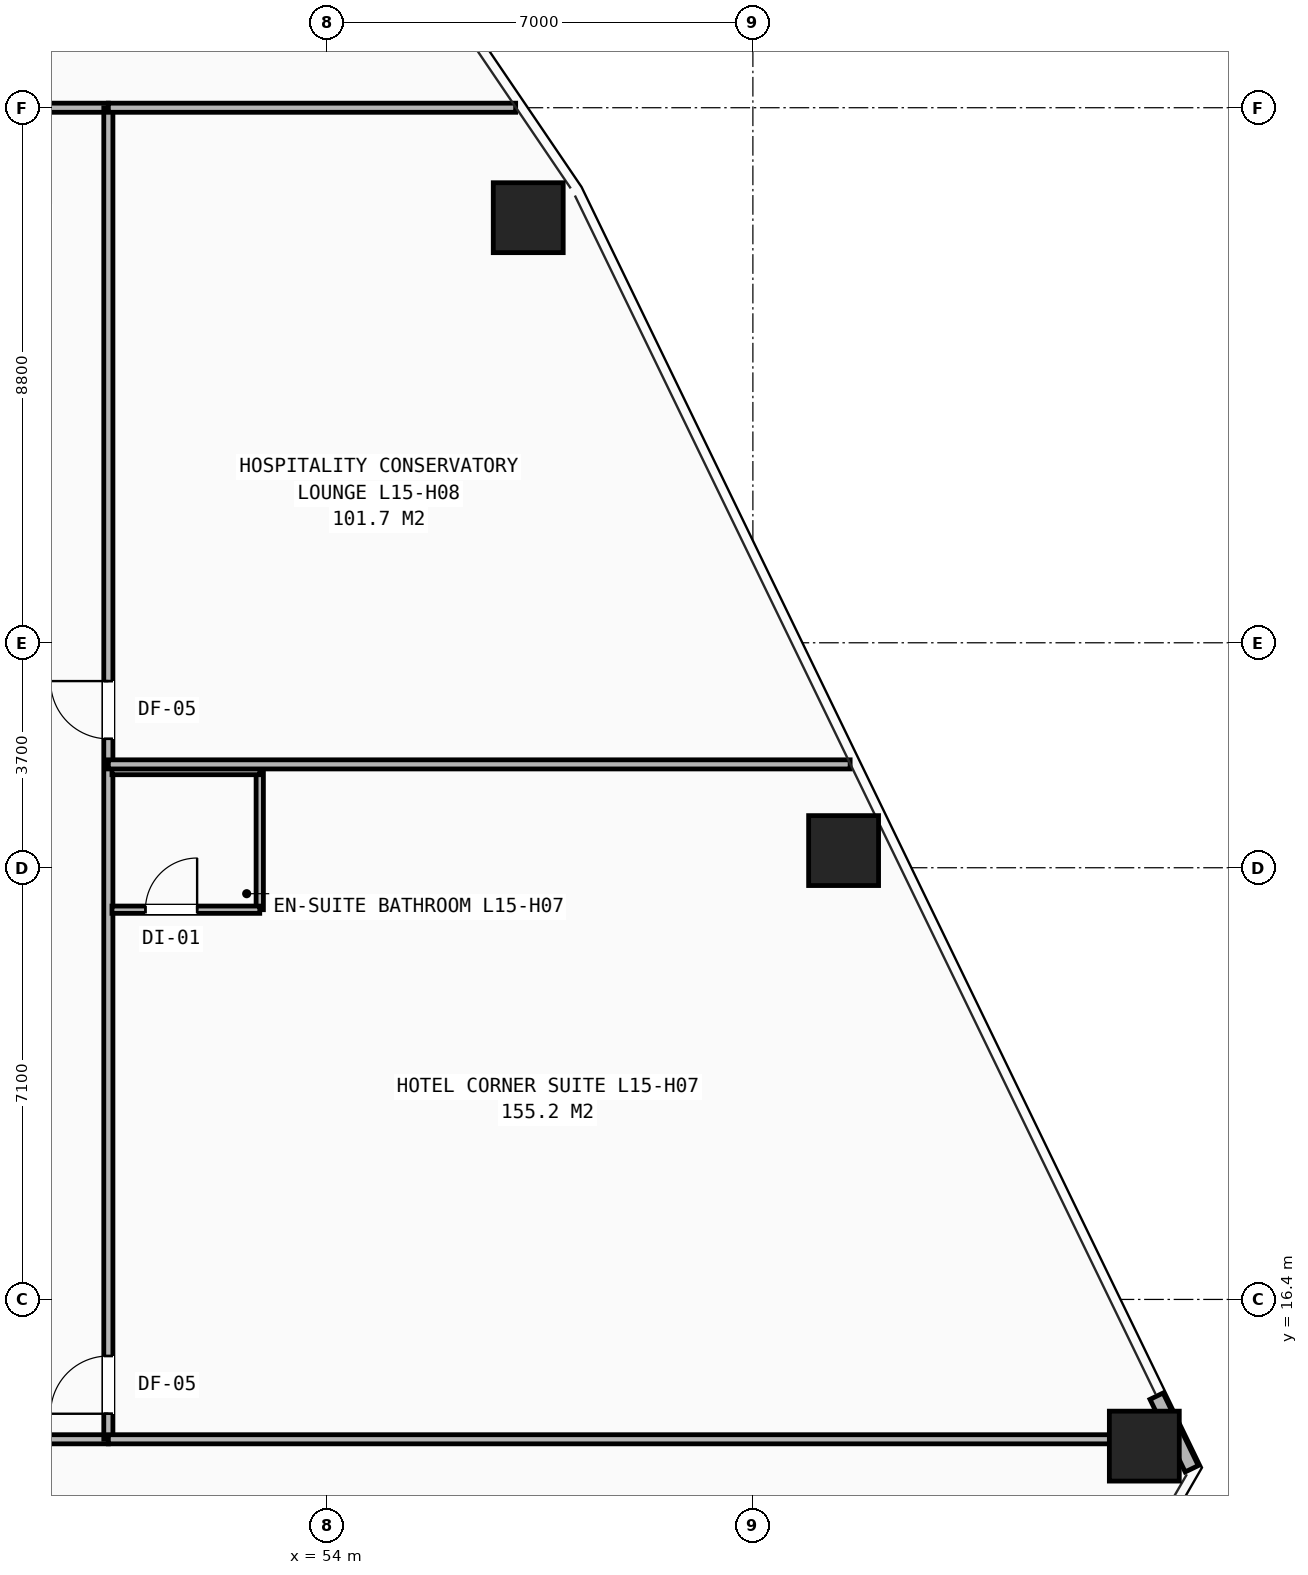
"""IFC4 building model, lengths in metres.
Left out: names, types, materials, properties, quantities, classifications, styles, units other than length and angle.
Written with IfcOpenShell. Run it as: python <this file> out.ifc"""

import sys

from ifc_helpers import new_model, si_unit, direction, frame, frame_2d, origin, origin_2d, place, context, subcontext, project, spatial, rectangle, hollow_rectangle, extrude, element, fill, save


model = new_model("IFC4")
c1 = context("Model", 3, precision=1e-05, world=origin(), true_north=direction((0.0, 1.0)))
c2 = subcontext(c1, "Body", "Model", "MODEL_VIEW")
j1 = project(units=[si_unit("LENGTHUNIT", "METRE"), si_unit("PLANEANGLEUNIT", "RADIAN")], contexts=[c1])
p1 = place(None, origin())
s1 = spatial("IfcSite", under=j1, at=p1, CompositionType="ELEMENT")
p2 = place(p1, origin())
s2 = spatial("IfcBuilding", under=s1, at=p2, CompositionType="ELEMENT")
p3 = place(p2, frame((0.0, 0.0, 56.0)))
s3 = spatial("IfcBuildingStorey", under=s2, at=p3, CompositionType="ELEMENT", Elevation=56.0)
for number, where, z_axis, x_axis in (
    (1, (67.437, 13.988, 0.0), (0.0, 0.0, 1.0), (1.0, 0.0, 0.0)),
    (2, (62.492, 23.782, 0.0), (0.0, 0.0, 1.0), (1.0, 0.0, 0.0)),
    (3, (57.305, 34.191, 0.0), (0.0, 0.0, 1.0), (1.0, 0.0, 0.0)),
):
    element("IfcColumn", number, at=place(p3, frame(where, z_axis=z_axis, x_axis=x_axis)), inside=s3, PredefinedType="COLUMN", context=c2, shape_type="SweptSolid", body=[
        extrude(hollow_rectangle(XDim=1.15, YDim=1.15, WallThickness=0.075, at=origin_2d()), origin(), (0.0, 0.0, 1.0), 3.2),
    ])
p4 = place(p3, frame((68.217, 13.615, 0.0), z_axis=(0.0, 0.0, 1.0), x_axis=(-0.435989010646, 0.89995198905, 0.0)))
e4 = element("IfcWall", 4, at=p4, inside=s3, PredefinedType="SHEAR", context=c2, shape_type="SweptSolid", body=[
    extrude(rectangle(XDim=1.327, YDim=0.24, at=frame_2d((0.663, 0.0))), origin(), (0.0, 0.0, 1.0), 2.263),
])
p5 = place(p3, frame((29.6, 14.1, 0.0), z_axis=(0.0, 0.0, 1.0), x_axis=(1.0, 0.0, 0.0)))
e5 = element("IfcWall", 5, at=p5, inside=s3, PredefinedType="PARTITIONING", context=c2, shape_type="SweptSolid", body=[
    extrude(rectangle(XDim=20.8, YDim=0.15, at=frame_2d((10.4, 0.0))), origin(), (0.0, 0.0, 1.0), 2.431),
])
p6 = place(p5, frame((0.57, 0.0, 0.0)))
e6 = element("IfcOpeningElement", 6, at=p6, cuts=e5, PredefinedType="OPENING", context=c2, shape_type="SweptSolid", body=[
    extrude(rectangle(XDim=0.95, YDim=2.1, at=frame_2d((0.475, 1.05))), frame((0.0, 0.085, 0.0), z_axis=(0.0, -1.0, 0.0), x_axis=(1.0, 0.0, 0.0)), (0.0, 0.0, 1.0), 0.17),
])
p7 = place(p5, frame((4.82, 0.0, 0.0)))
e7 = element("IfcOpeningElement", 7, at=p7, cuts=e5, PredefinedType="OPENING", context=c2, shape_type="SweptSolid", body=[
    extrude(rectangle(XDim=0.95, YDim=2.1, at=frame_2d((0.475, 1.05))), frame((0.0, 0.085, 0.0), z_axis=(0.0, -1.0, 0.0), x_axis=(1.0, 0.0, 0.0)), (0.0, 0.0, 1.0), 0.17),
])
p8 = place(p5, frame((10.82, 0.0, 0.0)))
e8 = element("IfcOpeningElement", 8, at=p8, cuts=e5, PredefinedType="OPENING", context=c2, shape_type="SweptSolid", body=[
    extrude(rectangle(XDim=0.95, YDim=2.1, at=frame_2d((0.475, 1.05))), frame((0.0, 0.085, 0.0), z_axis=(0.0, -1.0, 0.0), x_axis=(1.0, 0.0, 0.0)), (0.0, 0.0, 1.0), 0.17),
])
p9 = place(p5, frame((16.82, 0.0, 0.0)))
e9 = element("IfcOpeningElement", 9, at=p9, cuts=e5, PredefinedType="OPENING", context=c2, shape_type="SweptSolid", body=[
    extrude(rectangle(XDim=0.95, YDim=2.1, at=frame_2d((0.475, 1.05))), frame((0.0, 0.085, 0.0), z_axis=(0.0, -1.0, 0.0), x_axis=(1.0, 0.0, 0.0)), (0.0, 0.0, 1.0), 0.17),
])
p10 = place(p3, frame((40.75, 36.0, 0.0), z_axis=(0.0, 0.0, 1.0), x_axis=(1.0, 0.0, 0.0)))
e10 = element("IfcWall", 10, at=p10, inside=s3, PredefinedType="PARTITIONING", context=c2, shape_type="SweptSolid", body=[
    extrude(rectangle(XDim=9.65, YDim=0.15, at=frame_2d((4.825, 0.0))), origin(), (0.0, 0.0, 1.0), 2.513),
])
p11 = place(p3, frame((50.4, 14.1, 0.0), z_axis=(0.0, 0.0, 1.0), x_axis=(0.0, 1.0, 0.0)))
e11 = element("IfcWall", 11, at=p11, inside=s3, PredefinedType="PARTITIONING", context=c2, shape_type="SweptSolid", body=[
    extrude(rectangle(XDim=21.9, YDim=0.15, at=frame_2d((10.95, 0.0))), origin(), (0.0, 0.0, 1.0), 2.431),
])
p12 = place(p11, frame((0.42, 0.0, 0.0)))
e12 = element("IfcOpeningElement", 12, at=p12, cuts=e11, PredefinedType="OPENING", context=c2, shape_type="SweptSolid", body=[
    extrude(rectangle(XDim=0.95, YDim=2.1, at=frame_2d((0.475, 1.05))), frame((0.0, 0.085, 0.0), z_axis=(0.0, -1.0, 0.0), x_axis=(1.0, 0.0, 0.0)), (0.0, 0.0, 1.0), 0.17),
])
p13 = place(p11, frame((11.52, 0.0, 0.0)))
e13 = element("IfcOpeningElement", 13, at=p13, cuts=e11, PredefinedType="OPENING", context=c2, shape_type="SweptSolid", body=[
    extrude(rectangle(XDim=0.95, YDim=2.1, at=frame_2d((0.475, 1.05))), frame((0.0, 0.085, 0.0), z_axis=(0.0, -1.0, 0.0), x_axis=(1.0, 0.0, 0.0)), (0.0, 0.0, 1.0), 0.17),
])
p14 = place(p3, frame((50.4, 14.1, 0.0), z_axis=(0.0, 0.0, 1.0), x_axis=(1.0, 0.0, 0.0)))
e14 = element("IfcWall", 14, at=p14, inside=s3, PredefinedType="PARTITIONING", context=c2, shape_type="SweptSolid", body=[
    extrude(rectangle(XDim=17.577, YDim=0.15, at=frame_2d((8.789, 0.0))), origin(), (0.0, 0.0, 1.0), 2.268),
])
p15 = place(p3, frame((50.4, 36.0, 0.0), z_axis=(0.0, 0.0, 1.0), x_axis=(1.0, 0.0, 0.0)))
e15 = element("IfcWall", 15, at=p15, inside=s3, PredefinedType="PARTITIONING", context=c2, shape_type="SweptSolid", body=[
    extrude(rectangle(XDim=6.699, YDim=0.15, at=frame_2d((3.349, 0.0))), origin(), (0.0, 0.0, 1.0), 2.268),
])
p16 = place(p3, frame((52.89, 22.81, 0.0), z_axis=(0.0, 0.0, 1.0), x_axis=(0.0, 1.0, 0.0)))
e16 = element("IfcWall", 16, at=p16, inside=s3, PredefinedType="PARTITIONING", context=c2, shape_type="SweptSolid", body=[
    extrude(rectangle(XDim=2.28, YDim=0.12, at=frame_2d((1.14, 0.0))), origin(), (0.0, 0.0, 1.0), 2.98),
])
p17 = place(p3, frame((50.46, 22.81, 0.0), z_axis=(0.0, 0.0, 1.0), x_axis=(1.0, 0.0, 0.0)))
e17 = element("IfcWall", 17, at=p17, inside=s3, PredefinedType="PARTITIONING", context=c2, shape_type="SweptSolid", body=[
    extrude(rectangle(XDim=2.43, YDim=0.12, at=frame_2d((1.215, 0.0))), origin(), (0.0, 0.0, 1.0), 2.98),
])
p18 = place(p17, frame((0.55, 0.0, 0.0)))
e18 = element("IfcOpeningElement", 18, at=p18, cuts=e17, PredefinedType="OPENING", context=c2, shape_type="SweptSolid", body=[
    extrude(rectangle(XDim=0.85, YDim=2.05, at=frame_2d((0.425, 1.025))), frame((0.0, 0.07, 0.0), z_axis=(0.0, -1.0, 0.0), x_axis=(1.0, 0.0, 0.0)), (0.0, 0.0, 1.0), 0.14),
])
p19 = place(p3, frame((50.46, 25.09, 0.0), z_axis=(0.0, 0.0, 1.0), x_axis=(1.0, 0.0, 0.0)))
e19 = element("IfcWall", 19, at=p19, inside=s3, PredefinedType="PARTITIONING", context=c2, shape_type="SweptSolid", body=[
    extrude(rectangle(XDim=2.43, YDim=0.12, at=frame_2d((1.215, 0.0))), origin(), (0.0, 0.0, 1.0), 2.98),
])
p20 = place(p3, frame((50.4, 25.2, 0.0), z_axis=(0.0, 0.0, 1.0), x_axis=(1.0, 0.0, 0.0)))
e20 = element("IfcWall", 20, at=p20, inside=s3, PredefinedType="PARTITIONING", context=c2, shape_type="SweptSolid", body=[
    extrude(rectangle(XDim=12.199, YDim=0.15, at=frame_2d((6.1, 0.0))), origin(), (0.0, 0.0, 1.0), 2.268),
])
p21 = place(p12, origin())
e21 = element("IfcDoor", 21, at=p21, inside=s3, OperationType="SINGLE_SWING_LEFT", PredefinedType="DOOR", context=c2, shape_type="SweptSolid", body=[
    extrude(rectangle(XDim=0.95, YDim=2.1, at=frame_2d((0.475, 1.05))), frame((0.0, 0.025, 0.0), z_axis=(0.0, -1.0, 0.0), x_axis=(1.0, 0.0, 0.0)), (0.0, 0.0, 1.0), 0.05),
])
fill(e12, e21)
p22 = place(p18, origin())
e22 = element("IfcDoor", 22, at=p22, inside=s3, OperationType="SINGLE_SWING_RIGHT", PredefinedType="DOOR", context=c2, shape_type="SweptSolid", body=[
    extrude(rectangle(XDim=0.85, YDim=2.05, at=frame_2d((0.425, 1.025))), frame((0.0, 0.025, 0.0), z_axis=(0.0, -1.0, 0.0), x_axis=(1.0, 0.0, 0.0)), (0.0, 0.0, 1.0), 0.05),
])
fill(e18, e22)
p23 = place(p13, origin())
e23 = element("IfcDoor", 23, at=p23, inside=s3, OperationType="SINGLE_SWING_RIGHT", PredefinedType="DOOR", context=c2, shape_type="SweptSolid", body=[
    extrude(rectangle(XDim=0.95, YDim=2.1, at=frame_2d((0.475, 1.05))), frame((0.0, 0.025, 0.0), z_axis=(0.0, -1.0, 0.0), x_axis=(1.0, 0.0, 0.0)), (0.0, 0.0, 1.0), 0.05),
])
fill(e13, e23)
save(model, sys.argv[1])
